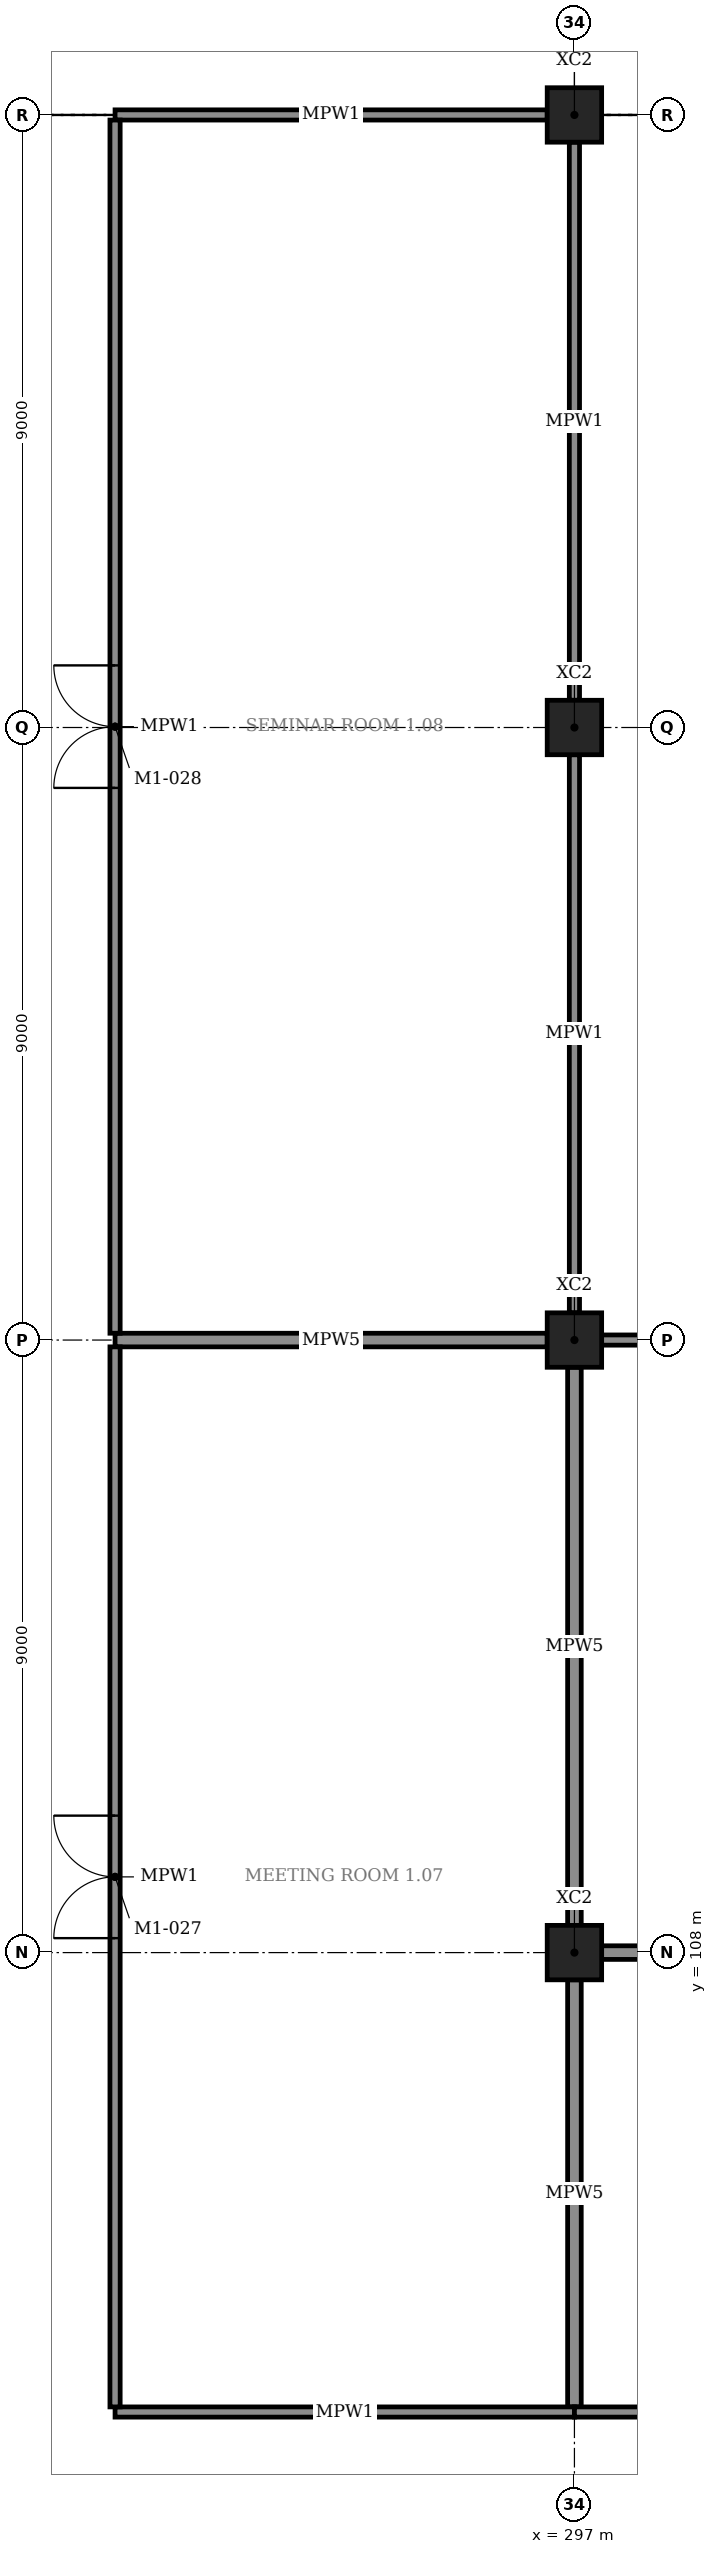
"""IFC4 building model, lengths in metres.
Left out: names, types, materials, properties, quantities, classifications, styles, units other than length and angle.
Written with IfcOpenShell. Run it as: python <this file> out.ifc"""

import sys

from ifc_helpers import new_model, si_unit, direction, frame, frame_2d, origin, origin_2d, place, context, subcontext, project, spatial, rectangle, extrude, element, fill, save


model = new_model("IFC4")
c1 = context("Model", 3, precision=1e-05, world=origin(), true_north=direction((0.0, 1.0)))
c2 = subcontext(c1, "Body", "Model", "MODEL_VIEW")
j1 = project(units=[si_unit("LENGTHUNIT", "METRE"), si_unit("PLANEANGLEUNIT", "RADIAN")], contexts=[c1])
p1 = place(None, origin())
s1 = spatial("IfcSite", under=j1, at=p1, CompositionType="ELEMENT")
p2 = place(p1, origin())
s2 = spatial("IfcBuilding", under=s1, at=p2, CompositionType="ELEMENT")
p3 = place(p2, frame((0.0, 0.0, 6.0)))
s3 = spatial("IfcBuildingStorey", under=s2, at=p3, CompositionType="ELEMENT", Elevation=6.0)
for number, where, z_axis, x_axis in (
    (1, (297.0, 108.0, 0.0), (0.0, 0.0, 1.0), (1.0, 0.0, 0.0)),
    (2, (297.0, 117.0, 0.0), (0.0, 0.0, 1.0), (1.0, 0.0, 0.0)),
    (3, (297.0, 126.0, 0.0), (0.0, 0.0, 1.0), (1.0, 0.0, 0.0)),
    (4, (297.0, 135.0, 0.0), (0.0, 0.0, 1.0), (1.0, 0.0, 0.0)),
):
    element("IfcColumn", number, at=place(p3, frame(where, z_axis=z_axis, x_axis=x_axis)), inside=s3, PredefinedType="COLUMN", context=c2, shape_type="SweptSolid", body=[
        extrude(rectangle(XDim=0.8, YDim=0.8, at=origin_2d()), origin(), (0.0, 0.0, 1.0), 5.5),
    ])
p4 = place(p3, frame((290.25, 101.25, 0.0), z_axis=(0.0, 0.0, 1.0), x_axis=(1.0, 0.0, 0.0)))
e5 = element("IfcWall", 5, at=p4, inside=s3, PredefinedType="PARTITIONING", context=c2, shape_type="SweptSolid", body=[
    extrude(rectangle(XDim=6.75, YDim=0.15, at=frame_2d((3.375, 0.0))), origin(), (0.0, 0.0, 1.0), 4.32),
])
p5 = place(p3, frame((290.25, 117.0, 0.0), z_axis=(0.0, 0.0, 1.0), x_axis=(1.0, 0.0, 0.0)))
e6 = element("IfcWall", 6, at=p5, inside=s3, PredefinedType="PARTITIONING", context=c2, shape_type="SweptSolid", body=[
    extrude(rectangle(XDim=6.35, YDim=0.2, at=frame_2d((3.175, 0.0))), origin(), (0.0, 0.0, 1.0), 4.32),
])
p6 = place(p3, frame((290.25, 101.325, 0.0), z_axis=(0.0, 0.0, 1.0), x_axis=(0.0, 1.0, 0.0)))
e7 = element("IfcWall", 7, at=p6, inside=s3, PredefinedType="PARTITIONING", context=c2, shape_type="SweptSolid", body=[
    extrude(rectangle(XDim=15.575, YDim=0.15, at=frame_2d((7.788, 0.0))), origin(), (0.0, 0.0, 1.0), 4.32),
])
p7 = place(p6, frame((6.887, 0.0, 0.0)))
e8 = element("IfcOpeningElement", 8, at=p7, cuts=e7, PredefinedType="OPENING", context=c2, shape_type="SweptSolid", body=[
    extrude(rectangle(XDim=1.8, YDim=2.4, at=frame_2d((0.9, 1.2))), frame((0.0, 0.085, 0.0), z_axis=(0.0, -1.0, 0.0), x_axis=(1.0, 0.0, 0.0)), (0.0, 0.0, 1.0), 0.17),
])
p8 = place(p3, frame((297.0, 101.325, 0.0), z_axis=(0.0, 0.0, 1.0), x_axis=(0.0, 1.0, 0.0)))
e9 = element("IfcWall", 9, at=p8, inside=s3, PredefinedType="PARTITIONING", context=c2, shape_type="SweptSolid", body=[
    extrude(rectangle(XDim=6.275, YDim=0.2, at=frame_2d((3.138, 0.0))), origin(), (0.0, 0.0, 1.0), 4.32),
])
p9 = place(p3, frame((297.0, 108.4, 0.0), z_axis=(0.0, 0.0, 1.0), x_axis=(0.0, 1.0, 0.0)))
e10 = element("IfcWall", 10, at=p9, inside=s3, PredefinedType="PARTITIONING", context=c2, shape_type="SweptSolid", body=[
    extrude(rectangle(XDim=8.2, YDim=0.2, at=frame_2d((4.1, 0.0))), origin(), (0.0, 0.0, 1.0), 4.32),
])
p10 = place(p3, frame((290.25, 135.0, 0.0), z_axis=(0.0, 0.0, 1.0), x_axis=(1.0, 0.0, 0.0)))
e11 = element("IfcWall", 11, at=p10, inside=s3, PredefinedType="PARTITIONING", context=c2, shape_type="SweptSolid", body=[
    extrude(rectangle(XDim=6.35, YDim=0.15, at=frame_2d((3.175, 0.0))), origin(), (0.0, 0.0, 1.0), 4.32),
])
p11 = place(p3, frame((290.25, 117.1, 0.0), z_axis=(0.0, 0.0, 1.0), x_axis=(0.0, 1.0, 0.0)))
e12 = element("IfcWall", 12, at=p11, inside=s3, PredefinedType="PARTITIONING", context=c2, shape_type="SweptSolid", body=[
    extrude(rectangle(XDim=17.825, YDim=0.15, at=frame_2d((8.913, 0.0))), origin(), (0.0, 0.0, 1.0), 4.32),
])
p12 = place(p11, frame((8.012, 0.0, 0.0)))
e13 = element("IfcOpeningElement", 13, at=p12, cuts=e12, PredefinedType="OPENING", context=c2, shape_type="SweptSolid", body=[
    extrude(rectangle(XDim=1.8, YDim=2.4, at=frame_2d((0.9, 1.2))), frame((0.0, 0.085, 0.0), z_axis=(0.0, -1.0, 0.0), x_axis=(1.0, 0.0, 0.0)), (0.0, 0.0, 1.0), 0.17),
])
for number, where, z_axis, x_axis in (
    (14, (297.0, 117.4, 0.0), (0.0, 0.0, 1.0), (0.0, 1.0, 0.0)),
    (15, (297.0, 126.4, 0.0), (0.0, 0.0, 1.0), (0.0, 1.0, 0.0)),
):
    element("IfcWall", number, at=place(p3, frame(where, z_axis=z_axis, x_axis=x_axis)), inside=s3, PredefinedType="PARTITIONING", context=c2, shape_type="SweptSolid", body=[
        extrude(rectangle(XDim=8.2, YDim=0.15, at=frame_2d((4.1, 0.0))), origin(), (0.0, 0.0, 1.0), 4.32),
    ])
p13 = place(p3, frame((297.0, 101.25, 0.0), z_axis=(0.0, 0.0, 1.0), x_axis=(1.0, 0.0, 0.0)))
e16 = element("IfcWall", 16, at=p13, inside=s3, PredefinedType="PARTITIONING", context=c2, shape_type="SweptSolid", body=[
    extrude(rectangle(XDim=9.0, YDim=0.15, at=frame_2d((4.5, 0.0))), origin(), (0.0, 0.0, 1.0), 4.32),
])
p14 = place(p13, frame((4.0, 0.0, 0.0)))
e17 = element("IfcOpeningElement", 17, at=p14, cuts=e16, PredefinedType="OPENING", context=c2, shape_type="SweptSolid", body=[
    extrude(rectangle(XDim=1.0, YDim=2.4, at=frame_2d((0.5, 1.2))), frame((0.0, 0.085, 0.0), z_axis=(0.0, -1.0, 0.0), x_axis=(1.0, 0.0, 0.0)), (0.0, 0.0, 1.0), 0.17),
])
p15 = place(p3, frame((297.4, 108.0, 0.0), z_axis=(0.0, 0.0, 1.0), x_axis=(1.0, 0.0, 0.0)))
e18 = element("IfcWall", 18, at=p15, inside=s3, PredefinedType="PARTITIONING", context=c2, shape_type="SweptSolid", body=[
    extrude(rectangle(XDim=8.2, YDim=0.2, at=frame_2d((4.1, 0.0))), origin(), (0.0, 0.0, 1.0), 4.32),
])
p16 = place(p3, frame((297.4, 117.0, 0.0), z_axis=(0.0, 0.0, 1.0), x_axis=(1.0, 0.0, 0.0)))
e19 = element("IfcWall", 19, at=p16, inside=s3, PredefinedType="PARTITIONING", context=c2, shape_type="SweptSolid", body=[
    extrude(rectangle(XDim=8.2, YDim=0.15, at=frame_2d((4.1, 0.0))), origin(), (0.0, 0.0, 1.0), 4.32),
])
p17 = place(p16, frame((3.2, 0.0, 0.0)))
e20 = element("IfcOpeningElement", 20, at=p17, cuts=e19, PredefinedType="OPENING", context=c2, shape_type="SweptSolid", body=[
    extrude(rectangle(XDim=1.8, YDim=2.4, at=frame_2d((0.9, 1.2))), frame((0.0, 0.085, 0.0), z_axis=(0.0, -1.0, 0.0), x_axis=(1.0, 0.0, 0.0)), (0.0, 0.0, 1.0), 0.17),
])
p18 = place(p7, origin())
e21 = element("IfcDoor", 21, at=p18, inside=s3, OperationType="DOUBLE_DOOR_SINGLE_SWING", PredefinedType="DOOR", context=c2, shape_type="SweptSolid", body=[
    extrude(rectangle(XDim=1.8, YDim=2.4, at=frame_2d((0.9, 1.2))), frame((0.0, 0.025, 0.0), z_axis=(0.0, -1.0, 0.0), x_axis=(1.0, 0.0, 0.0)), (0.0, 0.0, 1.0), 0.05),
])
fill(e8, e21)
p19 = place(p12, origin())
e22 = element("IfcDoor", 22, at=p19, inside=s3, OperationType="DOUBLE_DOOR_SINGLE_SWING", PredefinedType="DOOR", context=c2, shape_type="SweptSolid", body=[
    extrude(rectangle(XDim=1.8, YDim=2.4, at=frame_2d((0.9, 1.2))), frame((0.0, 0.025, 0.0), z_axis=(0.0, -1.0, 0.0), x_axis=(1.0, 0.0, 0.0)), (0.0, 0.0, 1.0), 0.05),
])
fill(e13, e22)
save(model, sys.argv[1])
